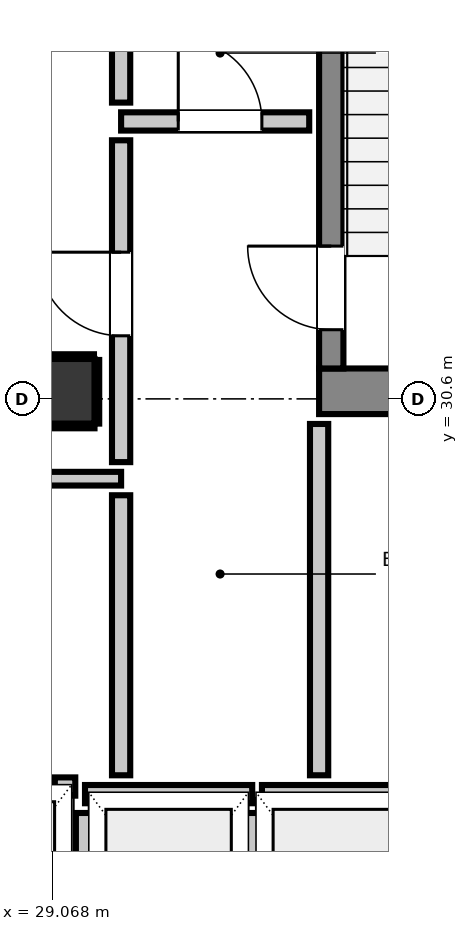
"""IFC4 building model, lengths in metres.
Left out: names, types, materials, properties, quantities, classifications, styles, units other than length and angle.
Written with IfcOpenShell. Run it as: python <this file> out.ifc"""

import sys

from ifc_helpers import new_model, si_unit, direction, frame, frame_2d, origin, origin_2d, place, context, subcontext, project, spatial, rectangle, extrude, element, fill, save


model = new_model("IFC4")
c1 = context("Model", 3, precision=1e-05, world=origin(), true_north=direction((0.0, 1.0)))
c2 = subcontext(c1, "Body", "Model", "MODEL_VIEW")
j1 = project(units=[si_unit("LENGTHUNIT", "METRE"), si_unit("PLANEANGLEUNIT", "RADIAN")], contexts=[c1])
p1 = place(None, origin())
s1 = spatial("IfcSite", under=j1, at=p1, CompositionType="ELEMENT")
p2 = place(p1, origin())
s2 = spatial("IfcBuilding", under=s1, at=p2, CompositionType="ELEMENT")
p3 = place(p2, frame((0.0, 0.0, 186.84)))
s3 = spatial("IfcBuildingStorey", under=s2, at=p3, CompositionType="ELEMENT", Elevation=186.84)
p4 = place(p3, frame((32.58, 30.7, 0.0), z_axis=(0.0, 0.0, 1.0), x_axis=(1.0, 0.0, 0.0)))
e1 = element("IfcWall", 1, at=p4, inside=s3, PredefinedType="SHEAR", context=c2, shape_type="SweptSolid", body=[
    extrude(rectangle(XDim=3.54, YDim=0.6, at=frame_2d((1.77, 0.0))), origin(), (0.0, 0.0, 1.0), 3.32),
])
p5 = place(p3, frame((32.74, 31.0, 0.0), z_axis=(0.0, 0.0, 1.0), x_axis=(0.0, 1.0, 0.0)))
e2 = element("IfcWall", 2, at=p5, inside=s3, PredefinedType="SHEAR", context=c2, shape_type="SweptSolid", body=[
    extrude(rectangle(XDim=7.8, YDim=0.32, at=frame_2d((3.9, 0.0))), origin(), (0.0, 0.0, 1.0), 3.32),
])
p6 = place(p5, frame((0.51, 0.0, 0.0)))
e3 = element("IfcOpeningElement", 3, at=p6, cuts=e2, PredefinedType="OPENING", context=c2, shape_type="SweptSolid", body=[
    extrude(rectangle(XDim=1.1, YDim=2.15, at=frame_2d((0.55, 1.075))), frame((0.0, 0.17, 0.0), z_axis=(0.0, -1.0, 0.0), x_axis=(1.0, 0.0, 0.0)), (0.0, 0.0, 1.0), 0.34),
])
p7 = place(p3, frame((29.2, 30.7, 0.0), z_axis=(0.0, 0.0, 1.0), x_axis=(1.0, 0.0, 0.0)))
e4 = element("IfcColumn", 4, at=p7, inside=s3, PredefinedType="COLUMN", context=c2, shape_type="SweptSolid", body=[
    extrude(rectangle(XDim=0.85, YDim=0.85, at=origin_2d()), origin(), (0.0, 0.0, 1.0), 3.32),
])
p8 = place(p3, frame((29.5, 25.4, 0.0), z_axis=(0.0, 0.0, 1.0), x_axis=(1.0, 0.0, 0.0)))
e5 = element("IfcWall", 5, at=p8, inside=s3, PredefinedType="PARTITIONING", context=c2, shape_type="SweptSolid", body=[
    extrude(rectangle(XDim=2.2, YDim=0.24, at=frame_2d((1.1, 0.0))), origin(), (0.0, 0.0, 1.0), 2.9),
])
p9 = place(p3, frame((29.5, 22.848, 0.0), z_axis=(0.0, 0.0, 1.0), x_axis=(0.0, 1.0, 0.0)))
e6 = element("IfcWall", 6, at=p9, inside=s3, PredefinedType="PARTITIONING", context=c2, shape_type="SweptSolid", body=[
    extrude(rectangle(XDim=2.304, YDim=0.24, at=frame_2d((1.152, 0.0))), origin(), (0.0, 0.0, 1.0), 0.905),
])
p10 = place(p3, frame((31.7, 22.848, 0.0), z_axis=(0.0, 0.0, 1.0), x_axis=(0.0, 1.0, 0.0)))
e7 = element("IfcWall", 7, at=p10, inside=s3, PredefinedType="PARTITIONING", context=c2, shape_type="SweptSolid", body=[
    extrude(rectangle(XDim=2.304, YDim=0.24, at=frame_2d((1.152, 0.0))), origin(), (0.0, 0.0, 1.0), 2.9),
])
p11 = place(p3, frame((31.828, 25.4, 0.0), z_axis=(0.0, 0.0, 1.0), x_axis=(1.0, 0.0, 0.0)))
e8 = element("IfcWall", 8, at=p11, inside=s3, PredefinedType="PARTITIONING", context=c2, shape_type="SweptSolid", body=[
    extrude(rectangle(XDim=2.072, YDim=0.24, at=frame_2d((1.036, 0.0))), origin(), (0.0, 0.0, 1.0), 2.9),
])
p12 = place(p3, frame((29.103, 25.5, 0.0), z_axis=(0.0, 0.0, 1.0), x_axis=(1.0, 0.0, 0.0)))
e9 = element("IfcWall", 9, at=p12, inside=s3, PredefinedType="PARTITIONING", context=c2, shape_type="SweptSolid", body=[
    extrude(rectangle(XDim=0.269, YDim=0.24, at=frame_2d((0.135, 0.0))), origin(), (0.0, 0.0, 1.0), 2.9),
])
p13 = place(p3, frame((29.975, 34.25, 0.0), z_axis=(0.0, 0.0, 1.0), x_axis=(1.0, 0.0, 0.0)))
e10 = element("IfcWall", 10, at=p13, inside=s3, PredefinedType="PARTITIONING", context=c2, shape_type="SweptSolid", body=[
    extrude(rectangle(XDim=2.475, YDim=0.24, at=frame_2d((1.237, 0.0))), origin(), (0.0, 0.0, 1.0), 2.9),
])
p14 = place(p13, frame((0.752, 0.0, 0.0)))
e11 = element("IfcOpeningElement", 11, at=p14, cuts=e10, PredefinedType="OPENING", context=c2, shape_type="SweptSolid", body=[
    extrude(rectangle(XDim=1.1, YDim=2.15, at=frame_2d((0.55, 1.075))), frame((0.0, 0.13, 0.0), z_axis=(0.0, -1.0, 0.0), x_axis=(1.0, 0.0, 0.0)), (0.0, 0.0, 1.0), 0.26),
])
p15 = place(p3, frame((28.593, 29.55, 0.0), z_axis=(0.0, 0.0, 1.0), x_axis=(1.0, 0.0, 0.0)))
e12 = element("IfcWall", 12, at=p15, inside=s3, PredefinedType="PARTITIONING", context=c2, shape_type="SweptSolid", body=[
    extrude(rectangle(XDim=1.382, YDim=0.18, at=frame_2d((0.691, 0.0))), origin(), (0.0, 0.0, 1.0), 2.9),
])
p16 = place(p3, frame((29.975, 25.648, 0.0), z_axis=(0.0, 0.0, 1.0), x_axis=(0.0, 1.0, 0.0)))
e13 = element("IfcWall", 13, at=p16, inside=s3, PredefinedType="PARTITIONING", context=c2, shape_type="SweptSolid", body=[
    extrude(rectangle(XDim=3.684, YDim=0.24, at=frame_2d((1.842, 0.0))), origin(), (0.0, 0.0, 1.0), 2.9),
])
p17 = place(p3, frame((29.975, 29.768, 0.0), z_axis=(0.0, 0.0, 1.0), x_axis=(0.0, 1.0, 0.0)))
e14 = element("IfcWall", 14, at=p17, inside=s3, PredefinedType="PARTITIONING", context=c2, shape_type="SweptSolid", body=[
    extrude(rectangle(XDim=4.234, YDim=0.24, at=frame_2d((2.117, 0.0))), origin(), (0.0, 0.0, 1.0), 2.9),
])
p18 = place(p17, frame((1.662, 0.0, 0.0)))
e15 = element("IfcOpeningElement", 15, at=p18, cuts=e14, PredefinedType="OPENING", context=c2, shape_type="SweptSolid", body=[
    extrude(rectangle(XDim=1.1, YDim=2.15, at=frame_2d((0.55, 1.075))), frame((0.0, 0.13, 0.0), z_axis=(0.0, -1.0, 0.0), x_axis=(1.0, 0.0, 0.0)), (0.0, 0.0, 1.0), 0.26),
])
p19 = place(p3, frame((29.975, 34.498, 0.0), z_axis=(0.0, 0.0, 1.0), x_axis=(0.0, 1.0, 0.0)))
e16 = element("IfcWall", 16, at=p19, inside=s3, PredefinedType="PARTITIONING", context=c2, shape_type="SweptSolid", body=[
    extrude(rectangle(XDim=0.934, YDim=0.24, at=frame_2d((0.467, 0.0))), origin(), (0.0, 0.0, 1.0), 2.9),
])
p20 = place(p3, frame((32.58, 25.648, 0.0), z_axis=(0.0, 0.0, 1.0), x_axis=(0.0, 1.0, 0.0)))
e17 = element("IfcWall", 17, at=p20, inside=s3, PredefinedType="PARTITIONING", context=c2, shape_type="SweptSolid", body=[
    extrude(rectangle(XDim=4.622, YDim=0.24, at=frame_2d((2.311, 0.0))), origin(), (0.0, 0.0, 1.0), 2.9),
])
p21 = place(p3, frame((28.775, 30.243, 0.0), z_axis=(0.0, 0.0, 1.0), x_axis=(1.0, 0.0, 0.0)))
e18 = element("IfcWall", 18, at=p21, inside=s3, PredefinedType="PARTITIONING", context=c2, shape_type="SweptSolid", body=[
    extrude(rectangle(XDim=0.85, YDim=0.06, at=frame_2d((0.425, 0.0))), origin(), (0.0, 0.0, 1.0), 0.905),
])
p22 = place(p3, frame((28.775, 31.157, 0.0), z_axis=(0.0, 0.0, 1.0), x_axis=(1.0, 0.0, 0.0)))
e19 = element("IfcWall", 19, at=p22, inside=s3, PredefinedType="PARTITIONING", context=c2, shape_type="SweptSolid", body=[
    extrude(rectangle(XDim=0.843, YDim=0.06, at=frame_2d((0.421, 0.0))), origin(), (0.0, 0.0, 1.0), 0.905),
])
p23 = place(p3, frame((29.657, 30.275, 0.0), z_axis=(0.0, 0.0, 1.0), x_axis=(0.0, 1.0, 0.0)))
e20 = element("IfcWall", 20, at=p23, inside=s3, PredefinedType="PARTITIONING", context=c2, shape_type="SweptSolid", body=[
    extrude(rectangle(XDim=0.837, YDim=0.06, at=frame_2d((0.418, 0.0))), origin(), (0.0, 0.0, 1.0), 0.905),
])
p24 = place(p6, origin())
e21 = element("IfcDoor", 21, at=p24, inside=s3, OperationType="SINGLE_SWING_RIGHT", PredefinedType="DOOR", context=c2, shape_type="SweptSolid", body=[
    extrude(rectangle(XDim=1.1, YDim=2.15, at=frame_2d((0.55, 1.075))), frame((0.0, 0.025, 0.0), z_axis=(0.0, -1.0, 0.0), x_axis=(1.0, 0.0, 0.0)), (0.0, 0.0, 1.0), 0.05),
])
fill(e3, e21)
p25 = place(p18, origin())
e22 = element("IfcDoor", 22, at=p25, inside=s3, OperationType="SINGLE_SWING_RIGHT", PredefinedType="DOOR", context=c2, shape_type="SweptSolid", body=[
    extrude(rectangle(XDim=1.1, YDim=2.15, at=frame_2d((0.55, 1.075))), frame((0.0, 0.025, 0.0), z_axis=(0.0, -1.0, 0.0), x_axis=(1.0, 0.0, 0.0)), (0.0, 0.0, 1.0), 0.05),
])
fill(e15, e22)
p26 = place(p14, origin())
e23 = element("IfcDoor", 23, at=p26, inside=s3, OperationType="SINGLE_SWING_LEFT", PredefinedType="DOOR", context=c2, shape_type="SweptSolid", body=[
    extrude(rectangle(XDim=1.1, YDim=2.15, at=frame_2d((0.55, 1.075))), frame((0.0, 0.025, 0.0), z_axis=(0.0, -1.0, 0.0), x_axis=(1.0, 0.0, 0.0)), (0.0, 0.0, 1.0), 0.05),
])
fill(e11, e23)
save(model, sys.argv[1])
